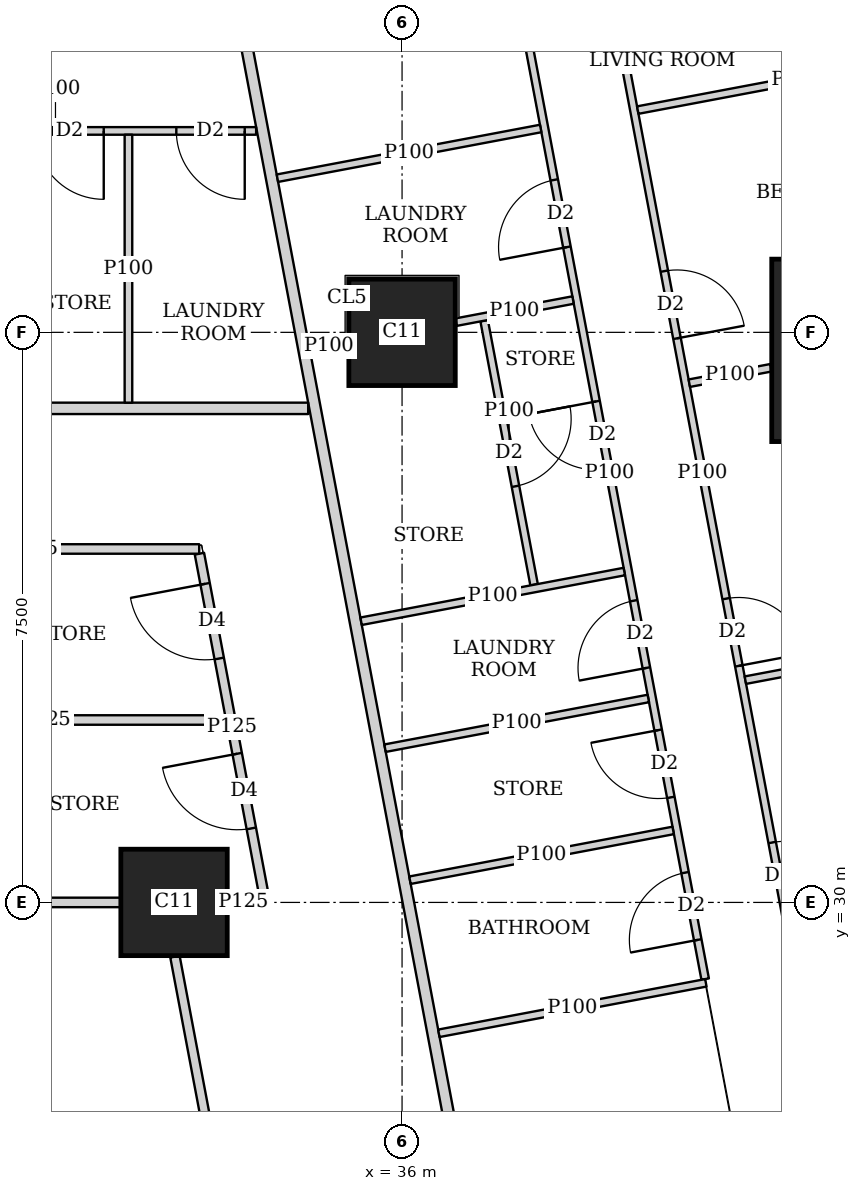
"""IFC4 building model, lengths in metres.
Left out: names, types, materials, properties, quantities, classifications, styles, units other than length and angle.
Written with IfcOpenShell. Run it as: python <this file> out.ifc"""

import sys

from ifc_helpers import new_model, si_unit, direction, frame, frame_2d, origin, origin_2d, place, context, subcontext, project, spatial, rectangle, extrude, element, fill, save


model = new_model("IFC4")
c1 = context("Model", 3, precision=1e-05, world=origin(), true_north=direction((0.0, 1.0)))
c2 = subcontext(c1, "Body", "Model", "MODEL_VIEW")
j1 = project(units=[si_unit("LENGTHUNIT", "METRE"), si_unit("PLANEANGLEUNIT", "RADIAN")], contexts=[c1])
p1 = place(None, origin())
s1 = spatial("IfcSite", under=j1, at=p1, CompositionType="ELEMENT")
p2 = place(p1, origin())
s2 = spatial("IfcBuilding", under=s1, at=p2, CompositionType="ELEMENT")
p3 = place(p2, frame((0.0, 0.0, 223.7)))
s3 = spatial("IfcBuildingStorey", under=s2, at=p3, CompositionType="ELEMENT", Elevation=223.7)
for number, where, z_axis, x_axis in (
    (1, (33.0, 30.0, 0.0), (0.0, 0.0, 1.0), (1.0, 0.0, 0.0)),
    (2, (36.0, 37.5, 0.0), (0.0, 0.0, 1.0), (1.0, 0.0, 0.0)),
):
    element("IfcColumn", number, at=place(p3, frame(where, z_axis=z_axis, x_axis=x_axis)), inside=s3, PredefinedType="COLUMN", context=c2, shape_type="SweptSolid", body=[
        extrude(rectangle(XDim=1.4, YDim=1.4, at=origin_2d()), origin(), (0.0, 0.0, 1.0), 3.75),
    ])
p4 = place(p3, frame((42.064, 37.263, 0.0), z_axis=(0.0, 0.0, 1.0), x_axis=(1.0, 0.0, 0.0)))
e3 = element("IfcColumn", 3, at=p4, inside=s3, PredefinedType="COLUMN", context=c2, shape_type="SweptSolid", body=[
    extrude(rectangle(XDim=2.4, YDim=2.4, at=origin_2d()), origin(), (0.0, 0.0, 1.0), 3.75),
])
p5 = place(p3, frame((16.201, 36.5, 0.0), z_axis=(0.0, 0.0, 1.0), x_axis=(1.0, 0.0, 0.0)))
e4 = element("IfcWall", 4, at=p5, inside=s3, PredefinedType="SOLIDWALL", context=c2, shape_type="SweptSolid", body=[
    extrude(rectangle(XDim=18.564, YDim=0.15, at=frame_2d((9.282, 0.0))), origin(), (0.0, 0.0, 1.0), 3.5),
])
p6 = place(p5, frame((0.874, 0.0, 0.0)))
e5 = element("IfcOpeningElement", 5, at=p6, cuts=e4, PredefinedType="OPENING", context=c2, shape_type="SweptSolid", body=[
    extrude(rectangle(XDim=1.0, YDim=2.1, at=frame_2d((0.5, 1.05))), frame((0.0, 0.085, 0.0), z_axis=(0.0, -1.0, 0.0), x_axis=(1.0, 0.0, 0.0)), (0.0, 0.0, 1.0), 0.17),
])
p7 = place(p5, frame((10.156, 0.0, 0.0)))
e6 = element("IfcOpeningElement", 6, at=p7, cuts=e4, PredefinedType="OPENING", context=c2, shape_type="SweptSolid", body=[
    extrude(rectangle(XDim=1.0, YDim=2.1, at=frame_2d((0.5, 1.05))), frame((0.0, 0.085, 0.0), z_axis=(0.0, -1.0, 0.0), x_axis=(1.0, 0.0, 0.0)), (0.0, 0.0, 1.0), 0.17),
])
p8 = place(p3, frame((33.68, 42.723, 0.0), z_axis=(0.0, 0.0, 1.0), x_axis=(0.185601160014, -0.982625162207, 0.0)))
e7 = element("IfcWall", 7, at=p8, inside=s3, PredefinedType="SOLIDWALL", context=c2, shape_type="SweptSolid", body=[
    extrude(rectangle(XDim=41.051, YDim=0.15, at=frame_2d((20.526, 0.0))), origin(), (0.0, 0.0, 1.0), 2.5),
])
p9 = place(p8, frame((16.123, 0.0, 0.0)))
e8 = element("IfcOpeningElement", 8, at=p9, cuts=e7, PredefinedType="OPENING", context=c2, shape_type="SweptSolid", body=[
    extrude(rectangle(XDim=1.0, YDim=2.1, at=frame_2d((0.5, 1.05))), frame((0.0, 0.085, 0.0), z_axis=(0.0, -1.0, 0.0), x_axis=(1.0, 0.0, 0.0)), (0.0, 0.0, 1.0), 0.17),
])
p10 = place(p8, frame((19.938, 0.0, 0.0)))
e9 = element("IfcOpeningElement", 9, at=p10, cuts=e7, PredefinedType="OPENING", context=c2, shape_type="SweptSolid", body=[
    extrude(rectangle(XDim=1.0, YDim=2.1, at=frame_2d((0.5, 1.05))), frame((0.0, 0.085, 0.0), z_axis=(0.0, -1.0, 0.0), x_axis=(1.0, 0.0, 0.0)), (0.0, 0.0, 1.0), 0.17),
])
p11 = place(p8, frame((30.902, 0.0, 0.0)))
e10 = element("IfcOpeningElement", 10, at=p11, cuts=e7, PredefinedType="OPENING", context=c2, shape_type="SweptSolid", body=[
    extrude(rectangle(XDim=1.0, YDim=2.1, at=frame_2d((0.5, 1.05))), frame((0.0, 0.085, 0.0), z_axis=(0.0, -1.0, 0.0), x_axis=(1.0, 0.0, 0.0)), (0.0, 0.0, 1.0), 0.17),
])
p12 = place(p3, frame((38.764, 41.941, 0.0), z_axis=(0.0, 0.0, 1.0), x_axis=(0.185512176227, -0.982641965556, 0.0)))
e11 = element("IfcWall", 11, at=p12, inside=s3, PredefinedType="PARTITIONING", context=c2, shape_type="SweptSolid", body=[
    extrude(rectangle(XDim=12.792, YDim=0.1, at=frame_2d((6.396, 0.0))), origin(), (0.0, 0.0, 1.0), 2.5),
])
p13 = place(p12, frame((11.35, 0.0, 0.0)))
e12 = element("IfcOpeningElement", 12, at=p13, cuts=e11, PredefinedType="OPENING", context=c2, shape_type="SweptSolid", body=[
    extrude(rectangle(XDim=0.9, YDim=2.1, at=frame_2d((0.45, 1.05))), frame((0.0, 0.06, 0.0), z_axis=(0.0, -1.0, 0.0), x_axis=(1.0, 0.0, 0.0)), (0.0, 0.0, 1.0), 0.12),
])
p14 = place(p12, frame((8.085, 0.0, 0.0)))
e13 = element("IfcOpeningElement", 13, at=p14, cuts=e11, PredefinedType="OPENING", context=c2, shape_type="SweptSolid", body=[
    extrude(rectangle(XDim=0.9, YDim=2.1, at=frame_2d((0.45, 1.05))), frame((0.0, 0.06, 0.0), z_axis=(0.0, -1.0, 0.0), x_axis=(1.0, 0.0, 0.0)), (0.0, 0.0, 1.0), 0.12),
])
p15 = place(p12, frame((3.7, 0.0, 0.0)))
e14 = element("IfcOpeningElement", 14, at=p15, cuts=e11, PredefinedType="OPENING", context=c2, shape_type="SweptSolid", body=[
    extrude(rectangle(XDim=0.9, YDim=2.1, at=frame_2d((0.45, 1.05))), frame((0.0, 0.06, 0.0), z_axis=(0.0, -1.0, 0.0), x_axis=(1.0, 0.0, 0.0)), (0.0, 0.0, 1.0), 0.12),
])
p16 = place(p3, frame((37.473, 42.309, 0.0), z_axis=(0.0, 0.0, 1.0), x_axis=(0.185570636839, -0.982630927024, 0.0)))
e15 = element("IfcWall", 15, at=p16, inside=s3, PredefinedType="PARTITIONING", context=c2, shape_type="SweptSolid", body=[
    extrude(rectangle(XDim=13.553, YDim=0.1, at=frame_2d((6.777, 0.0))), origin(), (0.0, 0.0, 1.0), 2.5),
])
p17 = place(p16, frame((12.128, 0.0, 0.0)))
e16 = element("IfcOpeningElement", 16, at=p17, cuts=e15, PredefinedType="OPENING", context=c2, shape_type="SweptSolid", body=[
    extrude(rectangle(XDim=0.9, YDim=2.1, at=frame_2d((0.45, 1.05))), frame((0.0, 0.06, 0.0), z_axis=(0.0, -1.0, 0.0), x_axis=(1.0, 0.0, 0.0)), (0.0, 0.0, 1.0), 0.12),
])
p18 = place(p16, frame((8.487, 0.0, 0.0)))
e17 = element("IfcOpeningElement", 17, at=p18, cuts=e15, PredefinedType="OPENING", context=c2, shape_type="SweptSolid", body=[
    extrude(rectangle(XDim=0.9, YDim=2.1, at=frame_2d((0.45, 1.05))), frame((0.0, 0.06, 0.0), z_axis=(0.0, -1.0, 0.0), x_axis=(1.0, 0.0, 0.0)), (0.0, 0.0, 1.0), 0.12),
])
p19 = place(p16, frame((2.853, 0.0, 0.0)))
e18 = element("IfcOpeningElement", 18, at=p19, cuts=e15, PredefinedType="OPENING", context=c2, shape_type="SweptSolid", body=[
    extrude(rectangle(XDim=0.9, YDim=2.1, at=frame_2d((0.45, 1.05))), frame((0.0, 0.06, 0.0), z_axis=(0.0, -1.0, 0.0), x_axis=(1.0, 0.0, 0.0)), (0.0, 0.0, 1.0), 0.12),
])
p20 = place(p16, frame((10.22, 0.0, 0.0)))
e19 = element("IfcOpeningElement", 19, at=p20, cuts=e15, PredefinedType="OPENING", context=c2, shape_type="SweptSolid", body=[
    extrude(rectangle(XDim=0.9, YDim=2.1, at=frame_2d((0.45, 1.05))), frame((0.0, 0.06, 0.0), z_axis=(0.0, -1.0, 0.0), x_axis=(1.0, 0.0, 0.0)), (0.0, 0.0, 1.0), 0.12),
])
p21 = place(p16, frame((5.819, 0.0, 0.0)))
e20 = element("IfcOpeningElement", 20, at=p21, cuts=e15, PredefinedType="OPENING", context=c2, shape_type="SweptSolid", body=[
    extrude(rectangle(XDim=0.9, YDim=2.1, at=frame_2d((0.45, 1.05))), frame((0.0, 0.06, 0.0), z_axis=(0.0, -1.0, 0.0), x_axis=(1.0, 0.0, 0.0)), (0.0, 0.0, 1.0), 0.12),
])
p22 = place(p3, frame((43.277, 41.212, 0.0), z_axis=(0.0, 0.0, 1.0), x_axis=(-0.982665405803, -0.185387972203, 0.0)))
e21 = element("IfcWall", 21, at=p22, inside=s3, PredefinedType="PARTITIONING", context=c2, shape_type="SweptSolid", body=[
    extrude(rectangle(XDim=4.25, YDim=0.1, at=frame_2d((2.125, 0.0))), origin(), (0.0, 0.0, 1.0), 2.05),
])
p23 = place(p3, frame((40.854, 37.034, 0.0), z_axis=(0.0, 0.0, 1.0), x_axis=(-0.982651678759, -0.185460718839, 0.0)))
e22 = element("IfcWall", 22, at=p23, inside=s3, PredefinedType="PARTITIONING", context=c2, shape_type="SweptSolid", body=[
    extrude(rectangle(XDim=1.094, YDim=0.1, at=frame_2d((0.547, 0.0))), origin(), (0.0, 0.0, 1.0), 3.5),
])
p24 = place(p3, frame((44.693, 33.713, 0.0), z_axis=(0.0, 0.0, 1.0), x_axis=(-0.982623519589, -0.185609856287, 0.0)))
e23 = element("IfcWall", 23, at=p24, inside=s3, PredefinedType="PARTITIONING", context=c2, shape_type="SweptSolid", body=[
    extrude(rectangle(XDim=4.25, YDim=0.1, at=frame_2d((2.125, 0.0))), origin(), (0.0, 0.0, 1.0), 2.05),
])
p25 = place(p3, frame((37.824, 40.182, 0.0), z_axis=(0.0, 0.0, 1.0), x_axis=(-0.982648794755, -0.185475998897, 0.0)))
e24 = element("IfcWall", 24, at=p25, inside=s3, PredefinedType="PARTITIONING", context=c2, shape_type="SweptSolid", body=[
    extrude(rectangle(XDim=3.525, YDim=0.1, at=frame_2d((1.763, 0.0))), origin(), (0.0, 0.0, 1.0), 3.5),
])
p26 = place(p3, frame((38.25, 37.925, 0.0), z_axis=(0.0, 0.0, 1.0), x_axis=(-0.982610209589, -0.185680305934, 0.0)))
e25 = element("IfcWall", 25, at=p26, inside=s3, PredefinedType="PARTITIONING", context=c2, shape_type="SweptSolid", body=[
    extrude(rectangle(XDim=1.567, YDim=0.1, at=frame_2d((0.784, 0.0))), origin(), (0.0, 0.0, 1.0), 3.5),
])
p27 = place(p3, frame((35.29, 37.366, 0.0), z_axis=(0.0, 0.0, 1.0), x_axis=(-0.982715597703, -0.185121727606, 0.0)))
e26 = element("IfcWall", 26, at=p27, inside=s3, PredefinedType="PARTITIONING", context=c2, shape_type="SweptSolid", body=[
    extrude(rectangle(XDim=0.513, YDim=0.1, at=frame_2d((0.256, 0.0))), origin(), (0.0, 0.0, 1.0), 3.5),
])
p28 = place(p3, frame((39.24, 32.683, 0.0), z_axis=(0.0, 0.0, 1.0), x_axis=(-0.982638553676, -0.185530247748, 0.0)))
e27 = element("IfcWall", 27, at=p28, inside=s3, PredefinedType="PARTITIONING", context=c2, shape_type="SweptSolid", body=[
    extrude(rectangle(XDim=3.525, YDim=0.1, at=frame_2d((1.763, 0.0))), origin(), (0.0, 0.0, 1.0), 3.5),
])
p29 = place(p3, frame((39.997, 28.942, 0.0), z_axis=(0.0, 0.0, 1.0), x_axis=(-0.982613029841, -0.185665380691, 0.0)))
e28 = element("IfcWall", 28, at=p29, inside=s3, PredefinedType="PARTITIONING", context=c2, shape_type="SweptSolid", body=[
    extrude(rectangle(XDim=3.575, YDim=0.1, at=frame_2d((1.788, 0.0))), origin(), (0.0, 0.0, 1.0), 3.5),
])
p30 = place(p3, frame((39.567, 30.947, 0.0), z_axis=(0.0, 0.0, 1.0), x_axis=(-0.982576058723, -0.185860939478, 0.0)))
e29 = element("IfcWall", 29, at=p30, inside=s3, PredefinedType="PARTITIONING", context=c2, shape_type="SweptSolid", body=[
    extrude(rectangle(XDim=3.524, YDim=0.1, at=frame_2d((1.762, 0.0))), origin(), (0.0, 0.0, 1.0), 2.5),
])
p31 = place(p3, frame((38.924, 34.353, 0.0), z_axis=(0.0, 0.0, 1.0), x_axis=(-0.982629014545, -0.18558076348, 0.0)))
e30 = element("IfcWall", 30, at=p31, inside=s3, PredefinedType="PARTITIONING", context=c2, shape_type="SweptSolid", body=[
    extrude(rectangle(XDim=3.524, YDim=0.1, at=frame_2d((1.762, 0.0))), origin(), (0.0, 0.0, 1.0), 3.5),
])
p32 = place(p3, frame((28.8, 40.15, 0.0), z_axis=(0.0, 0.0, 1.0), x_axis=(1.0, 0.0, 0.0)))
e31 = element("IfcWall", 31, at=p32, inside=s3, PredefinedType="PARTITIONING", context=c2, shape_type="SweptSolid", body=[
    extrude(rectangle(XDim=5.28, YDim=0.1, at=frame_2d((2.64, 0.0))), origin(), (0.0, 0.0, 1.0), 3.5),
])
p33 = place(p32, frame((0.575, 0.0, 0.0)))
e32 = element("IfcOpeningElement", 32, at=p33, cuts=e31, PredefinedType="OPENING", context=c2, shape_type="SweptSolid", body=[
    extrude(rectangle(XDim=0.9, YDim=2.1, at=frame_2d((0.45, 1.05))), frame((0.0, 0.06, 0.0), z_axis=(0.0, -1.0, 0.0), x_axis=(1.0, 0.0, 0.0)), (0.0, 0.0, 1.0), 0.12),
])
p34 = place(p32, frame((4.23, 0.0, 0.0)))
e33 = element("IfcOpeningElement", 33, at=p34, cuts=e31, PredefinedType="OPENING", context=c2, shape_type="SweptSolid", body=[
    extrude(rectangle(XDim=0.9, YDim=2.1, at=frame_2d((0.45, 1.05))), frame((0.0, 0.06, 0.0), z_axis=(0.0, -1.0, 0.0), x_axis=(1.0, 0.0, 0.0)), (0.0, 0.0, 1.0), 0.12),
])
p35 = place(p32, frame((2.375, 0.0, 0.0)))
e34 = element("IfcOpeningElement", 34, at=p35, cuts=e31, PredefinedType="OPENING", context=c2, shape_type="SweptSolid", body=[
    extrude(rectangle(XDim=0.9, YDim=2.1, at=frame_2d((0.45, 1.05))), frame((0.0, 0.06, 0.0), z_axis=(0.0, -1.0, 0.0), x_axis=(1.0, 0.0, 0.0)), (0.0, 0.0, 1.0), 0.12),
])
p36 = place(p3, frame((32.4, 36.575, 0.0), z_axis=(0.0, 0.0, 1.0), x_axis=(0.0, 1.0, 0.0)))
e35 = element("IfcWall", 35, at=p36, inside=s3, PredefinedType="PARTITIONING", context=c2, shape_type="SweptSolid", body=[
    extrude(rectangle(XDim=3.525, YDim=0.1, at=frame_2d((1.763, 0.0))), origin(), (0.0, 0.0, 1.0), 3.5),
])
p37 = place(p3, frame((37.08, 37.653, 0.0), z_axis=(0.0, 0.0, 1.0), x_axis=(0.185864634688, -0.982575359742, 0.0)))
e36 = element("IfcWall", 36, at=p37, inside=s3, PredefinedType="PARTITIONING", context=c2, shape_type="SweptSolid", body=[
    extrude(rectangle(XDim=3.535, YDim=0.1, at=frame_2d((1.767, 0.0))), origin(), (0.0, 0.0, 1.0), 3.5),
])
p38 = place(p37, frame((1.317, 0.0, 0.0)))
e37 = element("IfcOpeningElement", 37, at=p38, cuts=e36, PredefinedType="OPENING", context=c2, shape_type="SweptSolid", body=[
    extrude(rectangle(XDim=0.9, YDim=2.1, at=frame_2d((0.45, 1.05))), frame((0.0, 0.06, 0.0), z_axis=(0.0, -1.0, 0.0), x_axis=(1.0, 0.0, 0.0)), (0.0, 0.0, 1.0), 0.12),
])
p39 = place(p3, frame((28.95, 34.65, 0.0), z_axis=(0.0, 0.0, 1.0), x_axis=(1.0, 0.0, 0.0)))
e38 = element("IfcWall", 38, at=p39, inside=s3, PredefinedType="PARTITIONING", context=c2, shape_type="SweptSolid", body=[
    extrude(rectangle(XDim=4.381, YDim=0.125, at=frame_2d((2.19, 0.0))), origin(), (0.0, 0.0, 1.0), 3.5),
])
p40 = place(p3, frame((34.193, 30.04, 0.0), z_axis=(0.0, 0.0, 1.0), x_axis=(-0.185626015863, 0.982620467034, 0.0)))
e39 = element("IfcWall", 39, at=p40, inside=s3, PredefinedType="PARTITIONING", context=c2, shape_type="SweptSolid", body=[
    extrude(rectangle(XDim=4.628, YDim=0.125, at=frame_2d((2.314, 0.0))), origin(), (0.0, 0.0, 1.0), 2.5),
])
p41 = place(p40, frame((0.95, 0.0, 0.0)))
e40 = element("IfcOpeningElement", 40, at=p41, cuts=e39, PredefinedType="OPENING", context=c2, shape_type="SweptSolid", body=[
    extrude(rectangle(XDim=1.0, YDim=2.1, at=frame_2d((0.5, 1.05))), frame((0.0, 0.073, 0.0), z_axis=(0.0, -1.0, 0.0), x_axis=(1.0, 0.0, 0.0)), (0.0, 0.0, 1.0), 0.145),
])
p42 = place(p40, frame((3.225, 0.0, 0.0)))
e41 = element("IfcOpeningElement", 41, at=p42, cuts=e39, PredefinedType="OPENING", context=c2, shape_type="SweptSolid", body=[
    extrude(rectangle(XDim=1.0, YDim=2.1, at=frame_2d((0.5, 1.05))), frame((0.0, 0.073, 0.0), z_axis=(0.0, -1.0, 0.0), x_axis=(1.0, 0.0, 0.0)), (0.0, 0.0, 1.0), 0.145),
])
p43 = place(p3, frame((35.576, 15.713, 0.0), z_axis=(0.0, 0.0, 1.0), x_axis=(-0.185602982696, 0.982624817931, 0.0)))
e42 = element("IfcWall", 42, at=p43, inside=s3, PredefinedType="PARTITIONING", context=c2, shape_type="SweptSolid", body=[
    extrude(rectangle(XDim=13.814, YDim=0.125, at=frame_2d((6.907, 0.0))), origin(), (0.0, 0.0, 1.0), 2.5),
])
p44 = place(p43, frame((5.3, 0.0, 0.0)))
e43 = element("IfcOpeningElement", 43, at=p44, cuts=e42, PredefinedType="OPENING", context=c2, shape_type="SweptSolid", body=[
    extrude(rectangle(XDim=1.0, YDim=2.1, at=frame_2d((0.5, 1.05))), frame((0.0, 0.073, 0.0), z_axis=(0.0, -1.0, 0.0), x_axis=(1.0, 0.0, 0.0)), (0.0, 0.0, 1.0), 0.145),
])
p45 = place(p3, frame((29.25, 30.0, 0.0), z_axis=(0.0, 0.0, 1.0), x_axis=(1.0, 0.0, 0.0)))
e44 = element("IfcWall", 44, at=p45, inside=s3, PredefinedType="PARTITIONING", context=c2, shape_type="SweptSolid", body=[
    extrude(rectangle(XDim=3.049, YDim=0.125, at=frame_2d((1.524, 0.0))), origin(), (0.0, 0.0, 1.0), 3.5),
])
p46 = place(p3, frame((33.701, 30.0, 0.0), z_axis=(0.0, 0.0, 1.0), x_axis=(1.0, 0.0, 0.0)))
e45 = element("IfcWall", 45, at=p46, inside=s3, PredefinedType="PARTITIONING", context=c2, shape_type="SweptSolid", body=[
    extrude(rectangle(XDim=0.424, YDim=0.125, at=frame_2d((0.212, 0.0))), origin(), (0.0, 0.0, 1.0), 2.5),
])
p47 = place(p3, frame((28.95, 32.4, 0.0), z_axis=(0.0, 0.0, 1.0), x_axis=(1.0, 0.0, 0.0)))
e46 = element("IfcWall", 46, at=p47, inside=s3, PredefinedType="PARTITIONING", context=c2, shape_type="SweptSolid", body=[
    extrude(rectangle(XDim=4.722, YDim=0.125, at=frame_2d((2.361, 0.0))), origin(), (0.0, 0.0, 1.0), 3.5),
])
p48 = place(p13, origin())
e47 = element("IfcDoor", 47, at=p48, inside=s3, OperationType="SINGLE_SWING_RIGHT", PredefinedType="DOOR", context=c2, shape_type="SweptSolid", body=[
    extrude(rectangle(XDim=0.9, YDim=2.1, at=frame_2d((0.45, 1.05))), frame((0.0, 0.025, 0.0), z_axis=(0.0, -1.0, 0.0), x_axis=(1.0, 0.0, 0.0)), (0.0, 0.0, 1.0), 0.05),
])
fill(e12, e47)
p49 = place(p14, origin())
e48 = element("IfcDoor", 48, at=p49, inside=s3, OperationType="SINGLE_SWING_RIGHT", PredefinedType="DOOR", context=c2, shape_type="SweptSolid", body=[
    extrude(rectangle(XDim=0.9, YDim=2.1, at=frame_2d((0.45, 1.05))), frame((0.0, 0.025, 0.0), z_axis=(0.0, -1.0, 0.0), x_axis=(1.0, 0.0, 0.0)), (0.0, 0.0, 1.0), 0.05),
])
fill(e13, e48)
p50 = place(p15, origin())
e49 = element("IfcDoor", 49, at=p50, inside=s3, OperationType="SINGLE_SWING_RIGHT", PredefinedType="DOOR", context=c2, shape_type="SweptSolid", body=[
    extrude(rectangle(XDim=0.9, YDim=2.1, at=frame_2d((0.45, 1.05))), frame((0.0, 0.025, 0.0), z_axis=(0.0, -1.0, 0.0), x_axis=(1.0, 0.0, 0.0)), (0.0, 0.0, 1.0), 0.05),
])
fill(e14, e49)
p51 = place(p17, origin())
e50 = element("IfcDoor", 50, at=p51, inside=s3, OperationType="SINGLE_SWING_LEFT", PredefinedType="DOOR", context=c2, shape_type="SweptSolid", body=[
    extrude(rectangle(XDim=0.9, YDim=2.1, at=frame_2d((0.45, 1.05))), frame((0.0, 0.025, 0.0), z_axis=(0.0, -1.0, 0.0), x_axis=(1.0, 0.0, 0.0)), (0.0, 0.0, 1.0), 0.05),
])
fill(e16, e50)
p52 = place(p18, origin())
e51 = element("IfcDoor", 51, at=p52, inside=s3, OperationType="SINGLE_SWING_LEFT", PredefinedType="DOOR", context=c2, shape_type="SweptSolid", body=[
    extrude(rectangle(XDim=0.9, YDim=2.1, at=frame_2d((0.45, 1.05))), frame((0.0, 0.025, 0.0), z_axis=(0.0, -1.0, 0.0), x_axis=(1.0, 0.0, 0.0)), (0.0, 0.0, 1.0), 0.05),
])
fill(e17, e51)
p53 = place(p19, origin())
e52 = element("IfcDoor", 52, at=p53, inside=s3, OperationType="SINGLE_SWING_LEFT", PredefinedType="DOOR", context=c2, shape_type="SweptSolid", body=[
    extrude(rectangle(XDim=0.9, YDim=2.1, at=frame_2d((0.45, 1.05))), frame((0.0, 0.025, 0.0), z_axis=(0.0, -1.0, 0.0), x_axis=(1.0, 0.0, 0.0)), (0.0, 0.0, 1.0), 0.05),
])
fill(e18, e52)
p54 = place(p20, origin())
e53 = element("IfcDoor", 53, at=p54, inside=s3, OperationType="SINGLE_SWING_RIGHT", PredefinedType="DOOR", context=c2, shape_type="SweptSolid", body=[
    extrude(rectangle(XDim=0.9, YDim=2.1, at=frame_2d((0.45, 1.05))), frame((0.0, 0.025, 0.0), z_axis=(0.0, -1.0, 0.0), x_axis=(1.0, 0.0, 0.0)), (0.0, 0.0, 1.0), 0.05),
])
fill(e19, e53)
p55 = place(p21, origin())
e54 = element("IfcDoor", 54, at=p55, inside=s3, OperationType="SINGLE_SWING_RIGHT", PredefinedType="DOOR", context=c2, shape_type="SweptSolid", body=[
    extrude(rectangle(XDim=0.9, YDim=2.1, at=frame_2d((0.45, 1.05))), frame((0.0, 0.025, 0.0), z_axis=(0.0, -1.0, 0.0), x_axis=(1.0, 0.0, 0.0)), (0.0, 0.0, 1.0), 0.05),
])
fill(e20, e54)
p56 = place(p34, origin())
e55 = element("IfcDoor", 55, at=p56, inside=s3, OperationType="SINGLE_SWING_LEFT", PredefinedType="DOOR", context=c2, shape_type="SweptSolid", body=[
    extrude(rectangle(XDim=0.9, YDim=2.1, at=frame_2d((0.45, 1.05))), frame((0.0, 0.025, 0.0), z_axis=(0.0, -1.0, 0.0), x_axis=(1.0, 0.0, 0.0)), (0.0, 0.0, 1.0), 0.05),
])
fill(e33, e55)
p57 = place(p35, origin())
e56 = element("IfcDoor", 56, at=p57, inside=s3, OperationType="SINGLE_SWING_LEFT", PredefinedType="DOOR", context=c2, shape_type="SweptSolid", body=[
    extrude(rectangle(XDim=0.9, YDim=2.1, at=frame_2d((0.45, 1.05))), frame((0.0, 0.025, 0.0), z_axis=(0.0, -1.0, 0.0), x_axis=(1.0, 0.0, 0.0)), (0.0, 0.0, 1.0), 0.05),
])
fill(e34, e56)
p58 = place(p38, origin())
e57 = element("IfcDoor", 57, at=p58, inside=s3, OperationType="SINGLE_SWING_LEFT", PredefinedType="DOOR", context=c2, shape_type="SweptSolid", body=[
    extrude(rectangle(XDim=0.9, YDim=2.1, at=frame_2d((0.45, 1.05))), frame((0.0, 0.025, 0.0), z_axis=(0.0, -1.0, 0.0), x_axis=(1.0, 0.0, 0.0)), (0.0, 0.0, 1.0), 0.05),
])
fill(e37, e57)
p59 = place(p41, origin())
e58 = element("IfcDoor", 58, at=p59, inside=s3, OperationType="SINGLE_SWING_RIGHT", PredefinedType="DOOR", context=c2, shape_type="SweptSolid", body=[
    extrude(rectangle(XDim=1.0, YDim=2.1, at=frame_2d((0.5, 1.05))), frame((0.0, 0.025, 0.0), z_axis=(0.0, -1.0, 0.0), x_axis=(1.0, 0.0, 0.0)), (0.0, 0.0, 1.0), 0.05),
])
fill(e40, e58)
p60 = place(p42, origin())
e59 = element("IfcDoor", 59, at=p60, inside=s3, OperationType="SINGLE_SWING_RIGHT", PredefinedType="DOOR", context=c2, shape_type="SweptSolid", body=[
    extrude(rectangle(XDim=1.0, YDim=2.1, at=frame_2d((0.5, 1.05))), frame((0.0, 0.025, 0.0), z_axis=(0.0, -1.0, 0.0), x_axis=(1.0, 0.0, 0.0)), (0.0, 0.0, 1.0), 0.05),
])
fill(e41, e59)
save(model, sys.argv[1])
